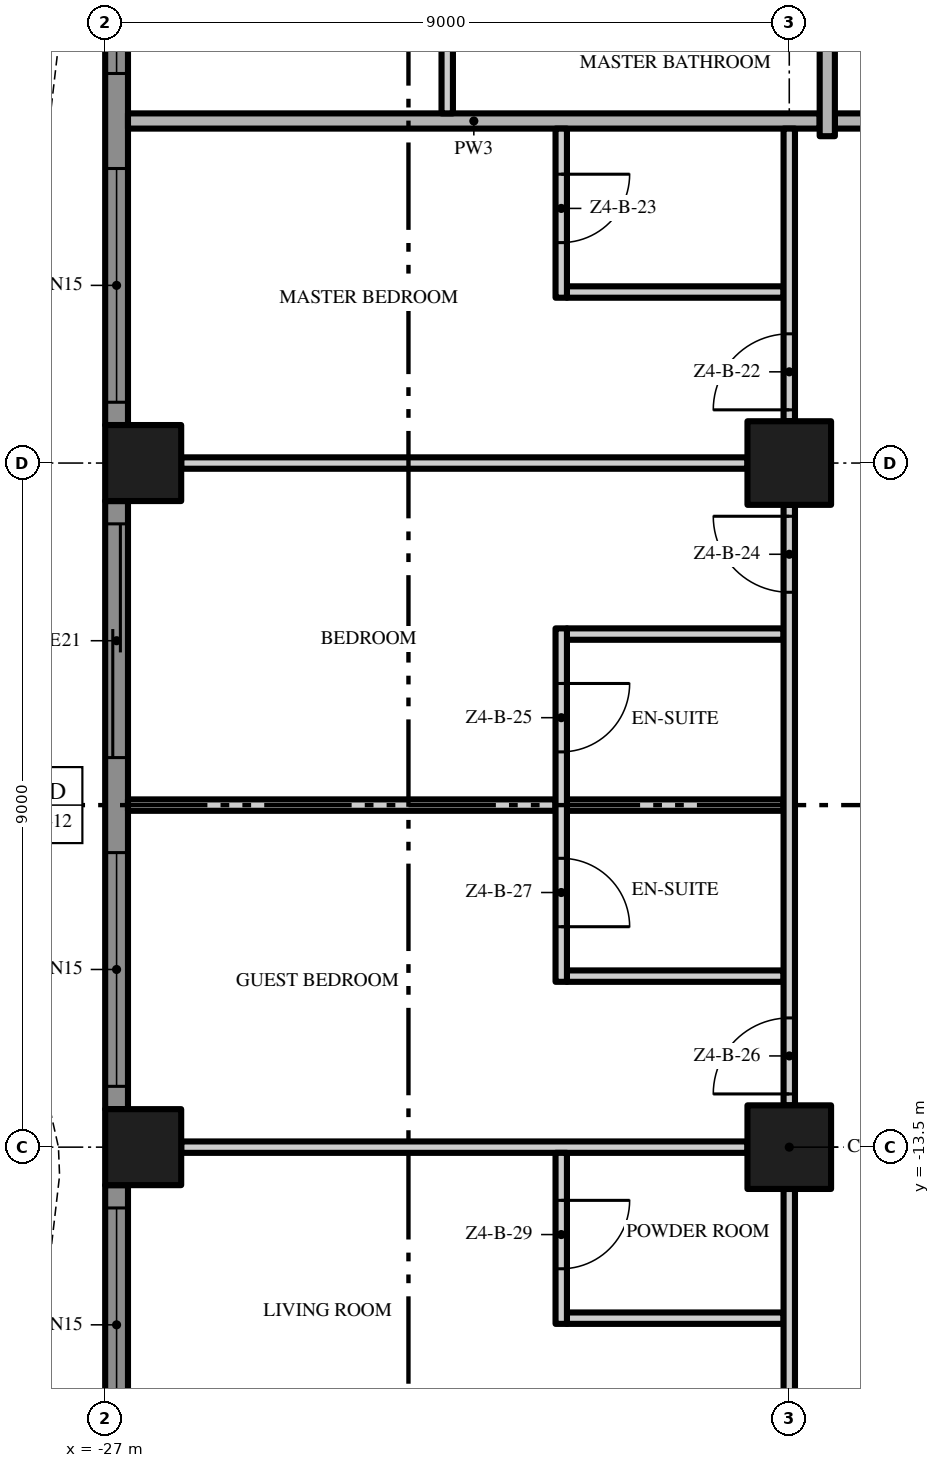
"""IFC4 building model, lengths in metres.
Left out: names, types, materials, properties, quantities, classifications, styles, units other than length and angle.
Written with IfcOpenShell. Run it as: python <this file> out.ifc"""

import sys

from ifc_helpers import new_model, si_unit, direction, frame, frame_2d, origin, origin_2d, place, context, subcontext, project, spatial, polyline, rectangle, outline, extrude, element, fill, save


model = new_model("IFC4")
c1 = context("Model", 3, precision=1e-05, world=origin(), true_north=direction((0.0, 1.0)))
c2 = subcontext(c1, "Body", "Model", "MODEL_VIEW")
j1 = project(units=[si_unit("LENGTHUNIT", "METRE"), si_unit("PLANEANGLEUNIT", "RADIAN")], contexts=[c1])
p1 = place(None, origin())
s1 = spatial("IfcSite", under=j1, at=p1, CompositionType="ELEMENT")
p2 = place(p1, origin())
s2 = spatial("IfcBuilding", under=s1, at=p2, CompositionType="ELEMENT")
p3 = place(p2, frame((0.0, 0.0, 199.6)))
s3 = spatial("IfcBuildingStorey", under=s2, at=p3, CompositionType="ELEMENT", Elevation=199.6)
for number, where, z_axis, x_axis in (
    (1, (-18.0, -13.5, 0.0), (0.0, 0.0, 1.0), (1.0, 0.0, 0.0)),
    (2, (-18.0, -4.5, 0.0), (0.0, 0.0, 1.0), (1.0, 0.0, 0.0)),
):
    element("IfcColumn", number, at=place(p3, frame(where, z_axis=z_axis, x_axis=x_axis)), inside=s3, PredefinedType="COLUMN", context=c2, shape_type="SweptSolid", body=[
        extrude(rectangle(XDim=1.1, YDim=1.1, at=origin_2d()), origin(), (0.0, 0.0, 1.0), 3.5),
    ])
for number, where, z_axis, x_axis in (
    (3, (-26.5, -13.5, 0.0), (0.0, 0.0, 1.0), (1.0, 0.0, 0.0)),
    (4, (-26.5, -4.5, 0.0), (0.0, 0.0, 1.0), (1.0, 0.0, 0.0)),
):
    element("IfcColumn", number, at=place(p3, frame(where, z_axis=z_axis, x_axis=x_axis)), inside=s3, PredefinedType="COLUMN", context=c2, shape_type="SweptSolid", body=[
        extrude(rectangle(XDim=1.0, YDim=1.0, at=origin_2d()), origin(), (0.0, 0.0, 1.0), 3.5),
    ])
p4 = place(p3, frame((-26.85, -4.0, 0.0), z_axis=(0.0, 0.0, 1.0), x_axis=(0.0, 1.0, 0.0)))
e5 = element("IfcWall", 5, at=p4, inside=s3, PredefinedType="SOLIDWALL", context=c2, shape_type="SweptSolid", body=[
    extrude(rectangle(XDim=8.0, YDim=0.3, at=frame_2d((4.0, 0.0))), origin(), (0.0, 0.0, 1.0), 3.5),
])
p5 = place(p4, frame((4.625, 0.0, 0.45)))
e6 = element("IfcOpeningElement", 6, at=p5, cuts=e5, PredefinedType="OPENING", context=c2, shape_type="SweptSolid", body=[
    extrude(rectangle(XDim=3.075, YDim=2.65, at=frame_2d((1.538, 1.325))), frame((0.0, 0.16, 0.0), z_axis=(0.0, -1.0, 0.0), x_axis=(1.0, 0.0, 0.0)), (0.0, 0.0, 1.0), 0.32),
])
p6 = place(p4, frame((0.3, 0.0, 0.45)))
e7 = element("IfcOpeningElement", 7, at=p6, cuts=e5, PredefinedType="OPENING", context=c2, shape_type="SweptSolid", body=[
    extrude(rectangle(XDim=3.075, YDim=2.65, at=frame_2d((1.538, 1.325))), frame((0.0, 0.16, 0.0), z_axis=(0.0, -1.0, 0.0), x_axis=(1.0, 0.0, 0.0)), (0.0, 0.0, 1.0), 0.32),
])
p7 = place(p3, frame((-26.85, -13.0, 0.0), z_axis=(0.0, 0.0, 1.0), x_axis=(0.0, 1.0, 0.0)))
e8 = element("IfcWall", 8, at=p7, inside=s3, PredefinedType="SOLIDWALL", context=c2, shape_type="SweptSolid", body=[
    extrude(rectangle(XDim=8.0, YDim=0.3, at=frame_2d((4.0, 0.0))), origin(), (0.0, 0.0, 1.0), 3.5),
])
p8 = place(p7, frame((4.625, 0.0, 0.0)))
e9 = element("IfcOpeningElement", 9, at=p8, cuts=e8, PredefinedType="OPENING", context=c2, shape_type="SweptSolid", body=[
    extrude(rectangle(XDim=3.075, YDim=2.4, at=frame_2d((1.538, 1.2))), frame((0.0, 0.16, 0.0), z_axis=(0.0, -1.0, 0.0), x_axis=(1.0, 0.0, 0.0)), (0.0, 0.0, 1.0), 0.32),
])
p9 = place(p7, frame((0.3, 0.0, 0.45)))
e10 = element("IfcOpeningElement", 10, at=p9, cuts=e8, PredefinedType="OPENING", context=c2, shape_type="SweptSolid", body=[
    extrude(rectangle(XDim=3.075, YDim=2.65, at=frame_2d((1.538, 1.325))), frame((0.0, 0.16, 0.0), z_axis=(0.0, -1.0, 0.0), x_axis=(1.0, 0.0, 0.0)), (0.0, 0.0, 1.0), 0.32),
])
p10 = place(p3, frame((-26.85, -18.0, 0.0), z_axis=(0.0, 0.0, 1.0), x_axis=(0.0, 1.0, 0.0)))
e11 = element("IfcWall", 11, at=p10, inside=s3, PredefinedType="SOLIDWALL", context=c2, shape_type="SweptSolid", body=[
    extrude(rectangle(XDim=4.0, YDim=0.3, at=frame_2d((2.0, 0.0))), origin(), (0.0, 0.0, 1.0), 3.5),
])
p11 = place(p10, frame((0.625, 0.0, 0.45)))
e12 = element("IfcOpeningElement", 12, at=p11, cuts=e11, PredefinedType="OPENING", context=c2, shape_type="SweptSolid", body=[
    extrude(rectangle(XDim=3.075, YDim=2.65, at=frame_2d((1.538, 1.325))), frame((0.0, 0.16, 0.0), z_axis=(0.0, -1.0, 0.0), x_axis=(1.0, 0.0, 0.0)), (0.0, 0.0, 1.0), 0.32),
])
p12 = place(p3, origin())
e13 = element("IfcWall", 13, at=p12, inside=s3, PredefinedType="USERDEFINED", context=c2, shape_type="SweptSolid", body=[
    extrude(outline(polyline([(-27.951, 18.0), (-27.615, 16.5), (-27.6, 16.125), (-27.731, 15.0), (-28.255, 13.5), (-28.988, 12.0), (-29.649, 10.5), (-29.985, 9.0), (-30.0, 8.625), (-29.869, 7.5), (-29.345, 6.0), (-28.612, 4.5), (-27.951, 3.0), (-27.615, 1.5), (-27.6, 1.125), (-27.731, 0.0), (-28.255, -1.5), (-28.988, -3.0), (-29.649, -4.5), (-29.985, -6.0), (-30.0, -6.375), (-29.869, -7.5), (-29.345, -9.0), (-28.612, -10.5), (-27.951, -12.0), (-27.615, -13.5), (-27.6, -13.875), (-27.731, -15.0), (-28.255, -16.5), (-28.988, -18.0), (-28.763, -18.11), (-28.024, -16.596), (-27.486, -15.056), (-27.349, -13.885), (-27.366, -13.467), (-27.713, -11.921), (-28.385, -10.395), (-29.114, -8.904), (-29.624, -7.444), (-29.749, -6.365), (-29.736, -6.033), (-29.41, -4.579), (-28.761, -3.105), (-28.024, -1.596), (-27.486, -0.056), (-27.349, 1.115), (-27.366, 1.533), (-27.713, 3.079), (-28.385, 4.605), (-29.114, 6.096), (-29.624, 7.556), (-29.749, 8.635), (-29.736, 8.967), (-29.41, 10.421), (-28.761, 11.895), (-28.024, 13.404), (-27.486, 14.944), (-27.349, 16.115), (-27.366, 16.533), (-27.708, 18.055), (-27.951, 18.0)])), origin(), (0.0, 0.0, 1.0), 0.9),
])
p13 = place(p3, frame((-20.925, -15.75, 0.0), z_axis=(0.0, 0.0, 1.0), x_axis=(1.0, 0.0, 0.0)))
e14 = element("IfcWall", 14, at=p13, inside=s3, PredefinedType="PARTITIONING", context=c2, shape_type="SweptSolid", body=[
    extrude(rectangle(XDim=2.85, YDim=0.15, at=frame_2d((1.425, 0.0))), origin(), (0.0, 0.0, 1.0), 3.5),
])
p14 = place(p3, frame((-26.0, -13.5, 0.0), z_axis=(0.0, 0.0, 1.0), x_axis=(1.0, 0.0, 0.0)))
e15 = element("IfcWall", 15, at=p14, inside=s3, PredefinedType="PARTITIONING", context=c2, shape_type="SweptSolid", body=[
    extrude(rectangle(XDim=7.45, YDim=0.15, at=frame_2d((3.725, 0.0))), origin(), (0.0, 0.0, 1.0), 3.5),
])
p15 = place(p3, frame((-20.925, -11.25, 0.0), z_axis=(0.0, 0.0, 1.0), x_axis=(1.0, 0.0, 0.0)))
e16 = element("IfcWall", 16, at=p15, inside=s3, PredefinedType="PARTITIONING", context=c2, shape_type="SweptSolid", body=[
    extrude(rectangle(XDim=2.85, YDim=0.15, at=frame_2d((1.425, 0.0))), origin(), (0.0, 0.0, 1.0), 3.5),
])
p16 = place(p3, frame((-26.7, -9.0, 0.0), z_axis=(0.0, 0.0, 1.0), x_axis=(1.0, 0.0, 0.0)))
e17 = element("IfcWall", 17, at=p16, inside=s3, PredefinedType="PARTITIONING", context=c2, shape_type="SweptSolid", body=[
    extrude(rectangle(XDim=5.625, YDim=0.15, at=frame_2d((2.812, 0.0))), origin(), (0.0, 0.0, 1.0), 3.5),
])
for number, where, z_axis, x_axis in (
    (18, (-20.925, -9.0, 0.0), (0.0, 0.0, 1.0), (1.0, 0.0, 0.0)),
    (19, (-20.925, -6.75, 0.0), (0.0, 0.0, 1.0), (1.0, 0.0, 0.0)),
):
    element("IfcWall", number, at=place(p3, frame(where, z_axis=z_axis, x_axis=x_axis)), inside=s3, PredefinedType="PARTITIONING", context=c2, shape_type="SweptSolid", body=[
        extrude(rectangle(XDim=2.85, YDim=0.15, at=frame_2d((1.425, 0.0))), origin(), (0.0, 0.0, 1.0), 3.5),
    ])
p17 = place(p3, frame((-26.0, -4.5, 0.0), z_axis=(0.0, 0.0, 1.0), x_axis=(1.0, 0.0, 0.0)))
e20 = element("IfcWall", 20, at=p17, inside=s3, PredefinedType="PARTITIONING", context=c2, shape_type="SweptSolid", body=[
    extrude(rectangle(XDim=7.45, YDim=0.15, at=frame_2d((3.725, 0.0))), origin(), (0.0, 0.0, 1.0), 3.5),
])
p18 = place(p3, frame((-20.925, -2.25, 0.0), z_axis=(0.0, 0.0, 1.0), x_axis=(1.0, 0.0, 0.0)))
e21 = element("IfcWall", 21, at=p18, inside=s3, PredefinedType="PARTITIONING", context=c2, shape_type="SweptSolid", body=[
    extrude(rectangle(XDim=2.85, YDim=0.15, at=frame_2d((1.425, 0.0))), origin(), (0.0, 0.0, 1.0), 3.5),
])
p19 = place(p3, frame((-17.4, 0.0, 0.0), z_axis=(0.0, 0.0, 1.0), x_axis=(1.0, 0.0, 0.0)))
e22 = element("IfcWall", 22, at=p19, inside=s3, PredefinedType="PARTITIONING", context=c2, shape_type="SweptSolid", body=[
    extrude(rectangle(XDim=12.8, YDim=0.2, at=frame_2d((6.4, 0.0))), origin(), (0.0, 0.0, 1.0), 3.5),
])
p20 = place(p3, frame((-26.7, 0.0, 0.0), z_axis=(0.0, 0.0, 1.0), x_axis=(1.0, 0.0, 0.0)))
e23 = element("IfcWall", 23, at=p20, inside=s3, PredefinedType="PARTITIONING", context=c2, shape_type="SweptSolid", body=[
    extrude(rectangle(XDim=9.1, YDim=0.2, at=frame_2d((4.55, 0.0))), origin(), (0.0, 0.0, 1.0), 3.5),
])
p21 = place(p3, frame((-22.5, 0.1, 0.0), z_axis=(0.0, 0.0, 1.0), x_axis=(0.0, 1.0, 0.0)))
e24 = element("IfcWall", 24, at=p21, inside=s3, PredefinedType="PARTITIONING", context=c2, shape_type="SweptSolid", body=[
    extrude(rectangle(XDim=17.4, YDim=0.15, at=frame_2d((8.7, 0.0))), origin(), (0.0, 0.0, 1.0), 3.5),
])
p22 = place(p21, frame((1.65, 0.0, 0.0)))
e25 = element("IfcOpeningElement", 25, at=p22, cuts=e24, PredefinedType="OPENING", context=c2, shape_type="SweptSolid", body=[
    extrude(rectangle(XDim=1.0, YDim=2.4, at=frame_2d((0.5, 1.2))), frame((0.0, 0.085, 0.0), z_axis=(0.0, -1.0, 0.0), x_axis=(1.0, 0.0, 0.0)), (0.0, 0.0, 1.0), 0.17),
])
p23 = place(p21, frame((8.0, 0.0, 0.0)))
e26 = element("IfcOpeningElement", 26, at=p23, cuts=e24, PredefinedType="OPENING", context=c2, shape_type="SweptSolid", body=[
    extrude(rectangle(XDim=1.8, YDim=2.4, at=frame_2d((0.9, 1.2))), frame((0.0, 0.085, 0.0), z_axis=(0.0, -1.0, 0.0), x_axis=(1.0, 0.0, 0.0)), (0.0, 0.0, 1.0), 0.17),
])
p24 = place(p3, frame((-21.0, -13.575, 0.0), z_axis=(0.0, 0.0, 1.0), x_axis=(0.0, -1.0, 0.0)))
e27 = element("IfcWall", 27, at=p24, inside=s3, PredefinedType="PARTITIONING", context=c2, shape_type="SweptSolid", body=[
    extrude(rectangle(XDim=2.25, YDim=0.15, at=frame_2d((1.125, 0.0))), origin(), (0.0, 0.0, 1.0), 3.5),
])
p25 = place(p24, frame((0.625, 0.0, 0.0)))
e28 = element("IfcOpeningElement", 28, at=p25, cuts=e27, PredefinedType="OPENING", context=c2, shape_type="SweptSolid", body=[
    extrude(rectangle(XDim=0.9, YDim=2.1, at=frame_2d((0.45, 1.05))), frame((0.0, 0.085, 0.0), z_axis=(0.0, -1.0, 0.0), x_axis=(1.0, 0.0, 0.0)), (0.0, 0.0, 1.0), 0.17),
])
p26 = place(p3, frame((-21.0, -6.675, 0.0), z_axis=(0.0, 0.0, 1.0), x_axis=(0.0, -1.0, 0.0)))
e29 = element("IfcWall", 29, at=p26, inside=s3, PredefinedType="PARTITIONING", context=c2, shape_type="SweptSolid", body=[
    extrude(rectangle(XDim=4.65, YDim=0.15, at=frame_2d((2.325, 0.0))), origin(), (0.0, 0.0, 1.0), 3.5),
])
p27 = place(p26, frame((0.725, 0.0, 0.0)))
e30 = element("IfcOpeningElement", 30, at=p27, cuts=e29, PredefinedType="OPENING", context=c2, shape_type="SweptSolid", body=[
    extrude(rectangle(XDim=0.9, YDim=2.1, at=frame_2d((0.45, 1.05))), frame((0.0, 0.085, 0.0), z_axis=(0.0, -1.0, 0.0), x_axis=(1.0, 0.0, 0.0)), (0.0, 0.0, 1.0), 0.17),
])
p28 = place(p26, frame((3.025, 0.0, 0.0)))
e31 = element("IfcOpeningElement", 31, at=p28, cuts=e29, PredefinedType="OPENING", context=c2, shape_type="SweptSolid", body=[
    extrude(rectangle(XDim=0.9, YDim=2.1, at=frame_2d((0.45, 1.05))), frame((0.0, 0.085, 0.0), z_axis=(0.0, -1.0, 0.0), x_axis=(1.0, 0.0, 0.0)), (0.0, 0.0, 1.0), 0.17),
])
p29 = place(p3, frame((-21.0, -0.1, 0.0), z_axis=(0.0, 0.0, 1.0), x_axis=(0.0, -1.0, 0.0)))
e32 = element("IfcWall", 32, at=p29, inside=s3, PredefinedType="PARTITIONING", context=c2, shape_type="SweptSolid", body=[
    extrude(rectangle(XDim=2.225, YDim=0.15, at=frame_2d((1.113, 0.0))), origin(), (0.0, 0.0, 1.0), 3.5),
])
p30 = place(p29, frame((0.6, 0.0, 0.0)))
e33 = element("IfcOpeningElement", 33, at=p30, cuts=e32, PredefinedType="OPENING", context=c2, shape_type="SweptSolid", body=[
    extrude(rectangle(XDim=0.9, YDim=2.1, at=frame_2d((0.45, 1.05))), frame((0.0, 0.085, 0.0), z_axis=(0.0, -1.0, 0.0), x_axis=(1.0, 0.0, 0.0)), (0.0, 0.0, 1.0), 0.17),
])
p31 = place(p3, frame((-18.0, -21.5, 0.0), z_axis=(0.0, 0.0, 1.0), x_axis=(0.0, 1.0, 0.0)))
e34 = element("IfcWall", 34, at=p31, inside=s3, PredefinedType="PARTITIONING", context=c2, shape_type="SweptSolid", body=[
    extrude(rectangle(XDim=7.45, YDim=0.15, at=frame_2d((3.725, 0.0))), origin(), (0.0, 0.0, 1.0), 3.5),
])
p32 = place(p31, frame((1.45, 0.0, 0.0)))
e35 = element("IfcOpeningElement", 35, at=p32, cuts=e34, PredefinedType="OPENING", context=c2, shape_type="SweptSolid", body=[
    extrude(rectangle(XDim=1.8, YDim=2.4, at=frame_2d((0.9, 1.2))), frame((0.0, 0.085, 0.0), z_axis=(0.0, -1.0, 0.0), x_axis=(1.0, 0.0, 0.0)), (0.0, 0.0, 1.0), 0.17),
])
p33 = place(p3, frame((-18.0, -12.95, 0.0), z_axis=(0.0, 0.0, 1.0), x_axis=(0.0, 1.0, 0.0)))
e36 = element("IfcWall", 36, at=p33, inside=s3, PredefinedType="PARTITIONING", context=c2, shape_type="SweptSolid", body=[
    extrude(rectangle(XDim=7.9, YDim=0.15, at=frame_2d((3.95, 0.0))), origin(), (0.0, 0.0, 1.0), 3.5),
])
p34 = place(p33, frame((6.75, 0.0, 0.0)))
e37 = element("IfcOpeningElement", 37, at=p34, cuts=e36, PredefinedType="OPENING", context=c2, shape_type="SweptSolid", body=[
    extrude(rectangle(XDim=1.0, YDim=2.4, at=frame_2d((0.5, 1.2))), frame((0.0, 0.085, 0.0), z_axis=(0.0, -1.0, 0.0), x_axis=(1.0, 0.0, 0.0)), (0.0, 0.0, 1.0), 0.17),
])
p35 = place(p33, frame((0.15, 0.0, 0.0)))
e38 = element("IfcOpeningElement", 38, at=p35, cuts=e36, PredefinedType="OPENING", context=c2, shape_type="SweptSolid", body=[
    extrude(rectangle(XDim=1.0, YDim=2.4, at=frame_2d((0.5, 1.2))), frame((0.0, 0.085, 0.0), z_axis=(0.0, -1.0, 0.0), x_axis=(1.0, 0.0, 0.0)), (0.0, 0.0, 1.0), 0.17),
])
p36 = place(p3, frame((-18.0, -3.95, 0.0), z_axis=(0.0, 0.0, 1.0), x_axis=(0.0, 1.0, 0.0)))
e39 = element("IfcWall", 39, at=p36, inside=s3, PredefinedType="PARTITIONING", context=c2, shape_type="SweptSolid", body=[
    extrude(rectangle(XDim=3.85, YDim=0.15, at=frame_2d((1.925, 0.0))), origin(), (0.0, 0.0, 1.0), 3.5),
])
p37 = place(p36, frame((0.15, 0.0, 0.0)))
e40 = element("IfcOpeningElement", 40, at=p37, cuts=e39, PredefinedType="OPENING", context=c2, shape_type="SweptSolid", body=[
    extrude(rectangle(XDim=1.0, YDim=2.4, at=frame_2d((0.5, 1.2))), frame((0.0, 0.085, 0.0), z_axis=(0.0, -1.0, 0.0), x_axis=(1.0, 0.0, 0.0)), (0.0, 0.0, 1.0), 0.17),
])
p38 = place(p3, frame((-17.5, -0.2, 0.0), z_axis=(0.0, 0.0, 1.0), x_axis=(0.0, 1.0, 0.0)))
e41 = element("IfcWall", 41, at=p38, inside=s3, PredefinedType="PARTITIONING", context=c2, shape_type="SweptSolid", body=[
    extrude(rectangle(XDim=4.15, YDim=0.2, at=frame_2d((2.075, 0.0))), origin(), (0.0, 0.0, 1.0), 3.5),
])
p39 = place(p5, origin())
e42 = element("IfcWindow", 42, at=p39, inside=s3, PartitioningType="SINGLE_PANEL", PredefinedType="WINDOW", context=c2, shape_type="SweptSolid", body=[
    extrude(rectangle(XDim=3.075, YDim=2.65, at=frame_2d((1.538, 1.325))), frame((0.0, 0.03, 0.0), z_axis=(0.0, -1.0, 0.0), x_axis=(1.0, 0.0, 0.0)), (0.0, 0.0, 1.0), 0.06),
])
fill(e6, e42)
p40 = place(p6, origin())
e43 = element("IfcWindow", 43, at=p40, inside=s3, PartitioningType="SINGLE_PANEL", PredefinedType="WINDOW", context=c2, shape_type="SweptSolid", body=[
    extrude(rectangle(XDim=3.075, YDim=2.65, at=frame_2d((1.538, 1.325))), frame((0.0, 0.03, 0.0), z_axis=(0.0, -1.0, 0.0), x_axis=(1.0, 0.0, 0.0)), (0.0, 0.0, 1.0), 0.06),
])
fill(e7, e43)
p41 = place(p8, origin())
e44 = element("IfcDoor", 44, at=p41, inside=s3, OperationType="SINGLE_SWING_LEFT", PredefinedType="DOOR", context=c2, shape_type="SweptSolid", body=[
    extrude(rectangle(XDim=3.075, YDim=2.4, at=frame_2d((1.538, 1.2))), frame((0.0, 0.025, 0.0), z_axis=(0.0, -1.0, 0.0), x_axis=(1.0, 0.0, 0.0)), (0.0, 0.0, 1.0), 0.05),
])
fill(e9, e44)
p42 = place(p9, origin())
e45 = element("IfcWindow", 45, at=p42, inside=s3, PartitioningType="SINGLE_PANEL", PredefinedType="WINDOW", context=c2, shape_type="SweptSolid", body=[
    extrude(rectangle(XDim=3.075, YDim=2.65, at=frame_2d((1.538, 1.325))), frame((0.0, 0.03, 0.0), z_axis=(0.0, -1.0, 0.0), x_axis=(1.0, 0.0, 0.0)), (0.0, 0.0, 1.0), 0.06),
])
fill(e10, e45)
p43 = place(p11, origin())
e46 = element("IfcWindow", 46, at=p43, inside=s3, PartitioningType="SINGLE_PANEL", PredefinedType="WINDOW", context=c2, shape_type="SweptSolid", body=[
    extrude(rectangle(XDim=3.075, YDim=2.65, at=frame_2d((1.538, 1.325))), frame((0.0, 0.03, 0.0), z_axis=(0.0, -1.0, 0.0), x_axis=(1.0, 0.0, 0.0)), (0.0, 0.0, 1.0), 0.06),
])
fill(e12, e46)
p44 = place(p37, origin())
e47 = element("IfcDoor", 47, at=p44, inside=s3, OperationType="SINGLE_SWING_LEFT", PredefinedType="DOOR", context=c2, shape_type="SweptSolid", body=[
    extrude(rectangle(XDim=1.0, YDim=2.4, at=frame_2d((0.5, 1.2))), frame((0.0, 0.025, 0.0), z_axis=(0.0, -1.0, 0.0), x_axis=(1.0, 0.0, 0.0)), (0.0, 0.0, 1.0), 0.05),
])
fill(e40, e47)
p45 = place(p30, origin())
e48 = element("IfcDoor", 48, at=p45, inside=s3, OperationType="SINGLE_SWING_LEFT", PredefinedType="DOOR", context=c2, shape_type="SweptSolid", body=[
    extrude(rectangle(XDim=0.9, YDim=2.1, at=frame_2d((0.45, 1.05))), frame((0.0, 0.025, 0.0), z_axis=(0.0, -1.0, 0.0), x_axis=(1.0, 0.0, 0.0)), (0.0, 0.0, 1.0), 0.05),
])
fill(e33, e48)
p46 = place(p34, origin())
e49 = element("IfcDoor", 49, at=p46, inside=s3, OperationType="SINGLE_SWING_RIGHT", PredefinedType="DOOR", context=c2, shape_type="SweptSolid", body=[
    extrude(rectangle(XDim=1.0, YDim=2.4, at=frame_2d((0.5, 1.2))), frame((0.0, 0.025, 0.0), z_axis=(0.0, -1.0, 0.0), x_axis=(1.0, 0.0, 0.0)), (0.0, 0.0, 1.0), 0.05),
])
fill(e37, e49)
p47 = place(p27, origin())
e50 = element("IfcDoor", 50, at=p47, inside=s3, OperationType="SINGLE_SWING_LEFT", PredefinedType="DOOR", context=c2, shape_type="SweptSolid", body=[
    extrude(rectangle(XDim=0.9, YDim=2.1, at=frame_2d((0.45, 1.05))), frame((0.0, 0.025, 0.0), z_axis=(0.0, -1.0, 0.0), x_axis=(1.0, 0.0, 0.0)), (0.0, 0.0, 1.0), 0.05),
])
fill(e30, e50)
p48 = place(p35, origin())
e51 = element("IfcDoor", 51, at=p48, inside=s3, OperationType="SINGLE_SWING_LEFT", PredefinedType="DOOR", context=c2, shape_type="SweptSolid", body=[
    extrude(rectangle(XDim=1.0, YDim=2.4, at=frame_2d((0.5, 1.2))), frame((0.0, 0.025, 0.0), z_axis=(0.0, -1.0, 0.0), x_axis=(1.0, 0.0, 0.0)), (0.0, 0.0, 1.0), 0.05),
])
fill(e38, e51)
p49 = place(p28, origin())
e52 = element("IfcDoor", 52, at=p49, inside=s3, OperationType="SINGLE_SWING_RIGHT", PredefinedType="DOOR", context=c2, shape_type="SweptSolid", body=[
    extrude(rectangle(XDim=0.9, YDim=2.1, at=frame_2d((0.45, 1.05))), frame((0.0, 0.025, 0.0), z_axis=(0.0, -1.0, 0.0), x_axis=(1.0, 0.0, 0.0)), (0.0, 0.0, 1.0), 0.05),
])
fill(e31, e52)
p50 = place(p25, origin())
e53 = element("IfcDoor", 53, at=p50, inside=s3, OperationType="SINGLE_SWING_LEFT", PredefinedType="DOOR", context=c2, shape_type="SweptSolid", body=[
    extrude(rectangle(XDim=0.9, YDim=2.1, at=frame_2d((0.45, 1.05))), frame((0.0, 0.025, 0.0), z_axis=(0.0, -1.0, 0.0), x_axis=(1.0, 0.0, 0.0)), (0.0, 0.0, 1.0), 0.05),
])
fill(e28, e53)
save(model, sys.argv[1])
